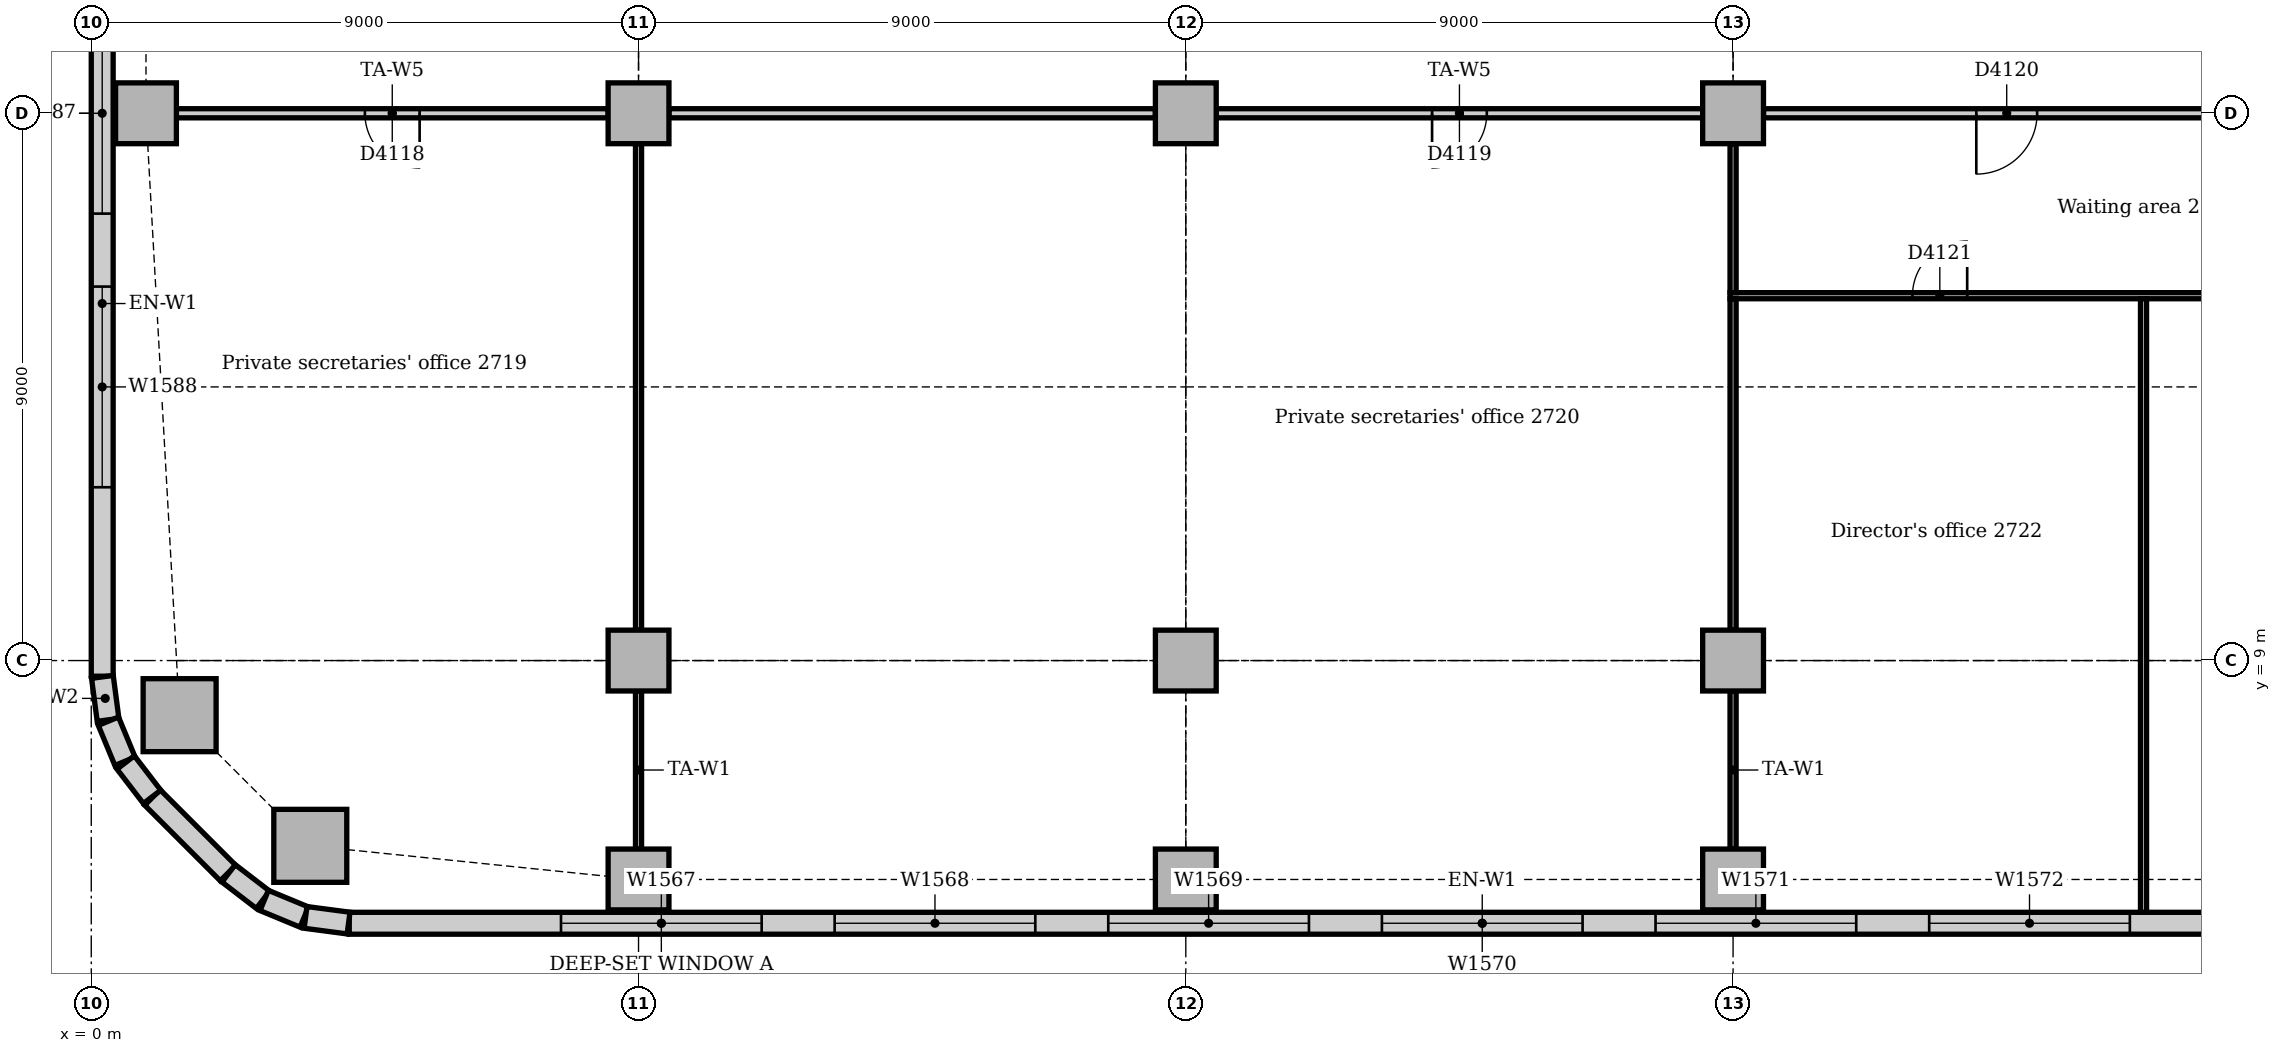
"""IFC4 building model, lengths in metres.
Left out: names, types, materials, properties, quantities, classifications, styles, units other than length and angle.
Written with IfcOpenShell. Run it as: python <this file> out.ifc"""

import sys

from ifc_helpers import new_model, si_unit, direction, frame, frame_2d, origin, origin_2d, place, context, subcontext, project, spatial, rectangle, extrude, element, fill, save


model = new_model("IFC4")
c1 = context("Model", 3, precision=1e-05, world=origin(), true_north=direction((0.0, 1.0)))
c2 = subcontext(c1, "Body", "Model", "MODEL_VIEW")
j1 = project(units=[si_unit("LENGTHUNIT", "METRE"), si_unit("PLANEANGLEUNIT", "RADIAN")], contexts=[c1])
p1 = place(None, origin())
s1 = spatial("IfcSite", under=j1, at=p1, CompositionType="ELEMENT")
p2 = place(p1, origin())
s2 = spatial("IfcBuilding", under=s1, at=p2, CompositionType="ELEMENT")
p3 = place(p2, frame((0.0, 0.0, 116.0)))
s3 = spatial("IfcBuildingStorey", under=s2, at=p3, CompositionType="ELEMENT", Elevation=116.0)
for number, where, z_axis, x_axis in (
    (1, (3.602, 5.953, 0.0), (0.0, 0.0, 1.0), (1.0, 0.0, 0.0)),
    (2, (1.453, 8.102, 0.0), (0.0, 0.0, 1.0), (1.0, 0.0, 0.0)),
):
    element("IfcColumn", number, at=place(p3, frame(where, z_axis=z_axis, x_axis=x_axis)), inside=s3, PredefinedType="COLUMN", context=c2, shape_type="SweptSolid", body=[
        extrude(rectangle(XDim=1.2, YDim=1.2, at=origin_2d()), origin(), (0.0, 0.0, 1.0), 3.85),
    ])
for number, where, z_axis, x_axis in (
    (3, (9.0, 5.4, 0.0), (0.0, 0.0, 1.0), (1.0, 0.0, 0.0)),
    (4, (18.0, 5.4, 0.0), (0.0, 0.0, 1.0), (1.0, 0.0, 0.0)),
    (5, (27.0, 5.4, 0.0), (0.0, 0.0, 1.0), (1.0, 0.0, 0.0)),
    (6, (0.9, 18.0, 0.0), (0.0, 0.0, 1.0), (1.0, 0.0, 0.0)),
    (7, (9.0, 9.0, 0.0), (0.0, 0.0, 1.0), (1.0, 0.0, 0.0)),
    (8, (9.0, 18.0, 0.0), (0.0, 0.0, 1.0), (1.0, 0.0, 0.0)),
    (9, (18.0, 9.0, 0.0), (0.0, 0.0, 1.0), (1.0, 0.0, 0.0)),
    (10, (18.0, 18.0, 0.0), (0.0, 0.0, 1.0), (1.0, 0.0, 0.0)),
    (11, (27.0, 9.0, 0.0), (0.0, 0.0, 1.0), (1.0, 0.0, 0.0)),
    (12, (27.0, 18.0, 0.0), (0.0, 0.0, 1.0), (1.0, 0.0, 0.0)),
):
    element("IfcColumn", number, at=place(p3, frame(where, z_axis=z_axis, x_axis=x_axis)), inside=s3, PredefinedType="COLUMN", context=c2, shape_type="SweptSolid", body=[
        extrude(rectangle(XDim=1.0, YDim=1.0, at=origin_2d()), origin(), (0.0, 0.0, 1.0), 3.85),
    ])
p4 = place(p3, frame((4.243, 4.68, 0.0), z_axis=(0.0, 0.0, 1.0), x_axis=(1.0, 0.0, 0.0)))
e13 = element("IfcWall", 13, at=p4, inside=s3, PredefinedType="STANDARD", context=c2, shape_type="SweptSolid", body=[
    extrude(rectangle(XDim=37.265, YDim=0.36, at=frame_2d((18.632, 0.0))), origin(), (0.0, 0.0, 1.0), 3.85),
])
p5 = place(p4, frame((3.482, 0.0, 0.9)))
e14 = element("IfcOpeningElement", 14, at=p5, cuts=e13, PredefinedType="OPENING", context=c2, shape_type="SweptSolid", body=[
    extrude(rectangle(XDim=3.3, YDim=1.6, at=frame_2d((1.65, 0.8))), frame((0.0, 0.19, 0.0), z_axis=(0.0, -1.0, 0.0), x_axis=(1.0, 0.0, 0.0)), (0.0, 0.0, 1.0), 0.38),
])
p6 = place(p4, frame((7.982, 0.0, 0.9)))
e15 = element("IfcOpeningElement", 15, at=p6, cuts=e13, PredefinedType="OPENING", context=c2, shape_type="SweptSolid", body=[
    extrude(rectangle(XDim=3.3, YDim=1.6, at=frame_2d((1.65, 0.8))), frame((0.0, 0.19, 0.0), z_axis=(0.0, -1.0, 0.0), x_axis=(1.0, 0.0, 0.0)), (0.0, 0.0, 1.0), 0.38),
])
p7 = place(p4, frame((12.482, 0.0, 0.9)))
e16 = element("IfcOpeningElement", 16, at=p7, cuts=e13, PredefinedType="OPENING", context=c2, shape_type="SweptSolid", body=[
    extrude(rectangle(XDim=3.3, YDim=1.6, at=frame_2d((1.65, 0.8))), frame((0.0, 0.19, 0.0), z_axis=(0.0, -1.0, 0.0), x_axis=(1.0, 0.0, 0.0)), (0.0, 0.0, 1.0), 0.38),
])
p8 = place(p4, frame((16.982, 0.0, 0.9)))
e17 = element("IfcOpeningElement", 17, at=p8, cuts=e13, PredefinedType="OPENING", context=c2, shape_type="SweptSolid", body=[
    extrude(rectangle(XDim=3.3, YDim=1.6, at=frame_2d((1.65, 0.8))), frame((0.0, 0.19, 0.0), z_axis=(0.0, -1.0, 0.0), x_axis=(1.0, 0.0, 0.0)), (0.0, 0.0, 1.0), 0.38),
])
p9 = place(p4, frame((21.482, 0.0, 0.9)))
e18 = element("IfcOpeningElement", 18, at=p9, cuts=e13, PredefinedType="OPENING", context=c2, shape_type="SweptSolid", body=[
    extrude(rectangle(XDim=3.3, YDim=1.6, at=frame_2d((1.65, 0.8))), frame((0.0, 0.19, 0.0), z_axis=(0.0, -1.0, 0.0), x_axis=(1.0, 0.0, 0.0)), (0.0, 0.0, 1.0), 0.38),
])
p10 = place(p4, frame((25.982, 0.0, 0.9)))
e19 = element("IfcOpeningElement", 19, at=p10, cuts=e13, PredefinedType="OPENING", context=c2, shape_type="SweptSolid", body=[
    extrude(rectangle(XDim=3.3, YDim=1.6, at=frame_2d((1.65, 0.8))), frame((0.0, 0.19, 0.0), z_axis=(0.0, -1.0, 0.0), x_axis=(1.0, 0.0, 0.0)), (0.0, 0.0, 1.0), 0.38),
])
p11 = place(p4, frame((30.482, 0.0, 0.9)))
e20 = element("IfcOpeningElement", 20, at=p11, cuts=e13, PredefinedType="OPENING", context=c2, shape_type="SweptSolid", body=[
    extrude(rectangle(XDim=3.3, YDim=1.6, at=frame_2d((1.65, 0.8))), frame((0.0, 0.19, 0.0), z_axis=(0.0, -1.0, 0.0), x_axis=(1.0, 0.0, 0.0)), (0.0, 0.0, 1.0), 0.38),
])
p12 = place(p3, frame((0.18, 21.0, 0.0), z_axis=(0.0, 0.0, 1.0), x_axis=(0.0, -1.0, 0.0)))
e21 = element("IfcWall", 21, at=p12, inside=s3, PredefinedType="STANDARD", context=c2, shape_type="SweptSolid", body=[
    extrude(rectangle(XDim=12.257, YDim=0.36, at=frame_2d((6.129, 0.0))), origin(), (0.0, 0.0, 1.0), 3.85),
])
p13 = place(p12, frame((1.35, 0.0, 0.9)))
e22 = element("IfcOpeningElement", 22, at=p13, cuts=e21, PredefinedType="OPENING", context=c2, shape_type="SweptSolid", body=[
    extrude(rectangle(XDim=3.3, YDim=1.6, at=frame_2d((1.65, 0.8))), frame((0.0, 0.19, 0.0), z_axis=(0.0, -1.0, 0.0), x_axis=(1.0, 0.0, 0.0)), (0.0, 0.0, 1.0), 0.38),
])
p14 = place(p12, frame((5.85, 0.0, 0.9)))
e23 = element("IfcOpeningElement", 23, at=p14, cuts=e21, PredefinedType="OPENING", context=c2, shape_type="SweptSolid", body=[
    extrude(rectangle(XDim=3.3, YDim=1.6, at=frame_2d((1.65, 0.8))), frame((0.0, 0.19, 0.0), z_axis=(0.0, -1.0, 0.0), x_axis=(1.0, 0.0, 0.0)), (0.0, 0.0, 1.0), 0.38),
])
p15 = place(p3, frame((1.006, 6.749, 0.0), z_axis=(0.0, 0.0, 1.0), x_axis=(0.707106781187, -0.707106781187, 0.0)))
e24 = element("IfcWall", 24, at=p15, inside=s3, PredefinedType="STANDARD", context=c2, shape_type="SweptSolid", body=[
    extrude(rectangle(XDim=1.757, YDim=0.36, at=frame_2d((0.879, 0.0))), origin(), (0.0, 0.0, 1.0), 3.85),
])
for number, where, z_axis, x_axis in (
    (25, (0.183, 8.731, 0.0), (0.0, 0.0, 1.0), (0.131, -0.991, 0.0)),
    (26, (0.282, 8.003, 0.0), (0.0, 0.0, 1.0), (0.383, -0.924, 0.0)),
):
    element("IfcWall", number, at=place(p3, frame(where, z_axis=z_axis, x_axis=x_axis)), inside=s3, PredefinedType="STANDARD", context=c2, shape_type="SweptSolid", body=[
        extrude(rectangle(XDim=0.713, YDim=0.36, at=frame_2d((0.356, 0.0))), origin(), (0.0, 0.0, 1.0), 3.85),
    ])
for number, where, z_axis, x_axis in (
    (27, (0.566, 7.324, 0.0), (0.0, 0.0, 1.0), (0.609, -0.793, 0.0)),
    (28, (2.259, 5.5, 0.0), (0.0, 0.0, 1.0), (0.793, -0.609, 0.0)),
):
    element("IfcWall", number, at=place(p3, frame(where, z_axis=z_axis, x_axis=x_axis)), inside=s3, PredefinedType="STANDARD", context=c2, shape_type="SweptSolid", body=[
        extrude(rectangle(XDim=0.713, YDim=0.36, at=frame_2d((0.357, 0.0))), origin(), (0.0, 0.0, 1.0), 3.85),
    ])
for number, where, z_axis, x_axis in (
    (29, (2.844, 5.055, 0.0), (0.0, 0.0, 1.0), (0.924, -0.383, 0.0)),
    (30, (3.524, 4.776, 0.0), (0.0, 0.0, 1.0), (0.991, -0.131, 0.0)),
):
    element("IfcWall", number, at=place(p3, frame(where, z_axis=z_axis, x_axis=x_axis)), inside=s3, PredefinedType="STANDARD", context=c2, shape_type="SweptSolid", body=[
        extrude(rectangle(XDim=0.713, YDim=0.36, at=frame_2d((0.356, 0.0))), origin(), (0.0, 0.0, 1.0), 3.85),
    ])
p16 = place(p3, frame((27.5, 18.0, 0.0), z_axis=(0.0, 0.0, 1.0), x_axis=(1.0, 0.0, 0.0)))
e31 = element("IfcWall", 31, at=p16, inside=s3, PredefinedType="PARTITIONING", context=c2, shape_type="SweptSolid", body=[
    extrude(rectangle(XDim=8.0, YDim=0.15, at=frame_2d((4.0, 0.0))), origin(), (0.0, 0.0, 1.0), 3.158),
])
p17 = place(p16, frame((3.5, 0.0, 0.0)))
e32 = element("IfcOpeningElement", 32, at=p17, cuts=e31, PredefinedType="OPENING", context=c2, shape_type="SweptSolid", body=[
    extrude(rectangle(XDim=1.0, YDim=2.1, at=frame_2d((0.5, 1.05))), frame((0.0, 0.085, 0.0), z_axis=(0.0, -1.0, 0.0), x_axis=(1.0, 0.0, 0.0)), (0.0, 0.0, 1.0), 0.17),
])
p18 = place(p3, frame((18.5, 18.0, 0.0), z_axis=(0.0, 0.0, 1.0), x_axis=(1.0, 0.0, 0.0)))
e33 = element("IfcWall", 33, at=p18, inside=s3, PredefinedType="PARTITIONING", context=c2, shape_type="SweptSolid", body=[
    extrude(rectangle(XDim=8.0, YDim=0.15, at=frame_2d((4.0, 0.0))), origin(), (0.0, 0.0, 1.0), 3.158),
])
p19 = place(p18, frame((3.55, 0.0, 0.0)))
e34 = element("IfcOpeningElement", 34, at=p19, cuts=e33, PredefinedType="OPENING", context=c2, shape_type="SweptSolid", body=[
    extrude(rectangle(XDim=0.9, YDim=2.1, at=frame_2d((0.45, 1.05))), frame((0.0, 0.085, 0.0), z_axis=(0.0, -1.0, 0.0), x_axis=(1.0, 0.0, 0.0)), (0.0, 0.0, 1.0), 0.17),
])
p20 = place(p3, frame((9.5, 18.0, 0.0), z_axis=(0.0, 0.0, 1.0), x_axis=(1.0, 0.0, 0.0)))
e35 = element("IfcWall", 35, at=p20, inside=s3, PredefinedType="PARTITIONING", context=c2, shape_type="SweptSolid", body=[
    extrude(rectangle(XDim=8.0, YDim=0.15, at=frame_2d((4.0, 0.0))), origin(), (0.0, 0.0, 1.0), 3.158),
])
p21 = place(p3, frame((1.4, 18.0, 0.0), z_axis=(0.0, 0.0, 1.0), x_axis=(1.0, 0.0, 0.0)))
e36 = element("IfcWall", 36, at=p21, inside=s3, PredefinedType="PARTITIONING", context=c2, shape_type="SweptSolid", body=[
    extrude(rectangle(XDim=7.1, YDim=0.15, at=frame_2d((3.55, 0.0))), origin(), (0.0, 0.0, 1.0), 3.158),
])
p22 = place(p21, frame((3.1, 0.0, 0.0)))
e37 = element("IfcOpeningElement", 37, at=p22, cuts=e36, PredefinedType="OPENING", context=c2, shape_type="SweptSolid", body=[
    extrude(rectangle(XDim=0.9, YDim=2.1, at=frame_2d((0.45, 1.05))), frame((0.0, 0.085, 0.0), z_axis=(0.0, -1.0, 0.0), x_axis=(1.0, 0.0, 0.0)), (0.0, 0.0, 1.0), 0.17),
])
p23 = place(p3, frame((26.95, 15.0, 0.0), z_axis=(0.0, 0.0, 1.0), x_axis=(1.0, 0.0, 0.0)))
e38 = element("IfcWall", 38, at=p23, inside=s3, PredefinedType="PARTITIONING", context=c2, shape_type="SweptSolid", body=[
    extrude(rectangle(XDim=13.6, YDim=0.1, at=frame_2d((6.8, 0.0))), origin(), (0.0, 0.0, 1.0), 3.85),
])
p24 = place(p23, frame((3.0, 0.0, 0.0)))
e39 = element("IfcOpeningElement", 39, at=p24, cuts=e38, PredefinedType="OPENING", context=c2, shape_type="SweptSolid", body=[
    extrude(rectangle(XDim=0.9, YDim=2.1, at=frame_2d((0.45, 1.05))), frame((0.0, 0.06, 0.0), z_axis=(0.0, -1.0, 0.0), x_axis=(1.0, 0.0, 0.0)), (0.0, 0.0, 1.0), 0.12),
])
p25 = place(p23, frame((9.65, 0.0, 0.0)))
e40 = element("IfcOpeningElement", 40, at=p25, cuts=e38, PredefinedType="OPENING", context=c2, shape_type="SweptSolid", body=[
    extrude(rectangle(XDim=0.9, YDim=2.1, at=frame_2d((0.45, 1.05))), frame((0.0, 0.06, 0.0), z_axis=(0.0, -1.0, 0.0), x_axis=(1.0, 0.0, 0.0)), (0.0, 0.0, 1.0), 0.12),
])
p26 = place(p3, frame((9.0, 5.9, 0.0), z_axis=(0.0, 0.0, 1.0), x_axis=(0.0, 1.0, 0.0)))
e41 = element("IfcWall", 41, at=p26, inside=s3, PredefinedType="PARTITIONING", context=c2, shape_type="SweptSolid", body=[
    extrude(rectangle(XDim=2.6, YDim=0.1, at=frame_2d((1.3, 0.0))), origin(), (0.0, 0.0, 1.0), 3.652),
])
p27 = place(p3, frame((9.0, 9.5, 0.0), z_axis=(0.0, 0.0, 1.0), x_axis=(0.0, 1.0, 0.0)))
e42 = element("IfcWall", 42, at=p27, inside=s3, PredefinedType="PARTITIONING", context=c2, shape_type="SweptSolid", body=[
    extrude(rectangle(XDim=8.0, YDim=0.1, at=frame_2d((4.0, 0.0))), origin(), (0.0, 0.0, 1.0), 3.256),
])
p28 = place(p3, frame((27.0, 5.9, 0.0), z_axis=(0.0, 0.0, 1.0), x_axis=(0.0, 1.0, 0.0)))
e43 = element("IfcWall", 43, at=p28, inside=s3, PredefinedType="PARTITIONING", context=c2, shape_type="SweptSolid", body=[
    extrude(rectangle(XDim=2.6, YDim=0.1, at=frame_2d((1.3, 0.0))), origin(), (0.0, 0.0, 1.0), 3.652),
])
p29 = place(p3, frame((27.0, 15.05, 0.0), z_axis=(0.0, 0.0, 1.0), x_axis=(0.0, 1.0, 0.0)))
e44 = element("IfcWall", 44, at=p29, inside=s3, PredefinedType="PARTITIONING", context=c2, shape_type="SweptSolid", body=[
    extrude(rectangle(XDim=2.45, YDim=0.1, at=frame_2d((1.225, 0.0))), origin(), (0.0, 0.0, 1.0), 3.256),
])
p30 = place(p3, frame((27.0, 9.5, 0.0), z_axis=(0.0, 0.0, 1.0), x_axis=(0.0, 1.0, 0.0)))
e45 = element("IfcWall", 45, at=p30, inside=s3, PredefinedType="PARTITIONING", context=c2, shape_type="SweptSolid", body=[
    extrude(rectangle(XDim=5.45, YDim=0.1, at=frame_2d((2.725, 0.0))), origin(), (0.0, 0.0, 1.0), 3.256),
])
p31 = place(p3, frame((33.75, 4.86, 0.0), z_axis=(0.0, 0.0, 1.0), x_axis=(0.0, 1.0, 0.0)))
e46 = element("IfcWall", 46, at=p31, inside=s3, PredefinedType="PARTITIONING", context=c2, shape_type="SweptSolid", body=[
    extrude(rectangle(XDim=10.09, YDim=0.1, at=frame_2d((5.045, 0.0))), origin(), (0.0, 0.0, 1.0), 3.85),
])
p32 = place(p5, origin())
e47 = element("IfcWindow", 47, at=p32, inside=s3, PartitioningType="SINGLE_PANEL", PredefinedType="WINDOW", context=c2, shape_type="SweptSolid", body=[
    extrude(rectangle(XDim=3.3, YDim=1.6, at=frame_2d((1.65, 0.8))), frame((0.0, 0.13, 0.0), z_axis=(0.0, -1.0, 0.0), x_axis=(1.0, 0.0, 0.0)), (0.0, 0.0, 1.0), 0.06),
])
fill(e14, e47)
p33 = place(p6, origin())
e48 = element("IfcWindow", 48, at=p33, inside=s3, PartitioningType="SINGLE_PANEL", PredefinedType="WINDOW", context=c2, shape_type="SweptSolid", body=[
    extrude(rectangle(XDim=3.3, YDim=1.6, at=frame_2d((1.65, 0.8))), frame((0.0, 0.13, 0.0), z_axis=(0.0, -1.0, 0.0), x_axis=(1.0, 0.0, 0.0)), (0.0, 0.0, 1.0), 0.06),
])
fill(e15, e48)
p34 = place(p7, origin())
e49 = element("IfcWindow", 49, at=p34, inside=s3, PartitioningType="SINGLE_PANEL", PredefinedType="WINDOW", context=c2, shape_type="SweptSolid", body=[
    extrude(rectangle(XDim=3.3, YDim=1.6, at=frame_2d((1.65, 0.8))), frame((0.0, 0.13, 0.0), z_axis=(0.0, -1.0, 0.0), x_axis=(1.0, 0.0, 0.0)), (0.0, 0.0, 1.0), 0.06),
])
fill(e16, e49)
p35 = place(p8, origin())
e50 = element("IfcWindow", 50, at=p35, inside=s3, PartitioningType="SINGLE_PANEL", PredefinedType="WINDOW", context=c2, shape_type="SweptSolid", body=[
    extrude(rectangle(XDim=3.3, YDim=1.6, at=frame_2d((1.65, 0.8))), frame((0.0, 0.13, 0.0), z_axis=(0.0, -1.0, 0.0), x_axis=(1.0, 0.0, 0.0)), (0.0, 0.0, 1.0), 0.06),
])
fill(e17, e50)
p36 = place(p9, origin())
e51 = element("IfcWindow", 51, at=p36, inside=s3, PartitioningType="SINGLE_PANEL", PredefinedType="WINDOW", context=c2, shape_type="SweptSolid", body=[
    extrude(rectangle(XDim=3.3, YDim=1.6, at=frame_2d((1.65, 0.8))), frame((0.0, 0.13, 0.0), z_axis=(0.0, -1.0, 0.0), x_axis=(1.0, 0.0, 0.0)), (0.0, 0.0, 1.0), 0.06),
])
fill(e18, e51)
p37 = place(p10, origin())
e52 = element("IfcWindow", 52, at=p37, inside=s3, PartitioningType="SINGLE_PANEL", PredefinedType="WINDOW", context=c2, shape_type="SweptSolid", body=[
    extrude(rectangle(XDim=3.3, YDim=1.6, at=frame_2d((1.65, 0.8))), frame((0.0, 0.13, 0.0), z_axis=(0.0, -1.0, 0.0), x_axis=(1.0, 0.0, 0.0)), (0.0, 0.0, 1.0), 0.06),
])
fill(e19, e52)
p38 = place(p13, origin())
e53 = element("IfcWindow", 53, at=p38, inside=s3, PartitioningType="SINGLE_PANEL", PredefinedType="WINDOW", context=c2, shape_type="SweptSolid", body=[
    extrude(rectangle(XDim=3.3, YDim=1.6, at=frame_2d((1.65, 0.8))), frame((0.0, 0.13, 0.0), z_axis=(0.0, -1.0, 0.0), x_axis=(1.0, 0.0, 0.0)), (0.0, 0.0, 1.0), 0.06),
])
fill(e22, e53)
p39 = place(p14, origin())
e54 = element("IfcWindow", 54, at=p39, inside=s3, PartitioningType="SINGLE_PANEL", PredefinedType="WINDOW", context=c2, shape_type="SweptSolid", body=[
    extrude(rectangle(XDim=3.3, YDim=1.6, at=frame_2d((1.65, 0.8))), frame((0.0, 0.13, 0.0), z_axis=(0.0, -1.0, 0.0), x_axis=(1.0, 0.0, 0.0)), (0.0, 0.0, 1.0), 0.06),
])
fill(e23, e54)
p40 = place(p22, frame((0.9, 0.0, 0.0), z_axis=(0.0, 0.0, 1.0), x_axis=(-1.0, 0.0, 0.0)))
e55 = element("IfcDoor", 55, at=p40, inside=s3, OperationType="SINGLE_SWING_LEFT", PredefinedType="DOOR", context=c2, shape_type="SweptSolid", body=[
    extrude(rectangle(XDim=0.9, YDim=2.1, at=frame_2d((0.45, 1.05))), frame((0.0, 0.025, 0.0), z_axis=(0.0, -1.0, 0.0), x_axis=(1.0, 0.0, 0.0)), (0.0, 0.0, 1.0), 0.05),
])
fill(e37, e55)
p41 = place(p19, frame((0.9, 0.0, 0.0), z_axis=(0.0, 0.0, 1.0), x_axis=(-1.0, 0.0, 0.0)))
e56 = element("IfcDoor", 56, at=p41, inside=s3, OperationType="SINGLE_SWING_RIGHT", PredefinedType="DOOR", context=c2, shape_type="SweptSolid", body=[
    extrude(rectangle(XDim=0.9, YDim=2.1, at=frame_2d((0.45, 1.05))), frame((0.0, 0.025, 0.0), z_axis=(0.0, -1.0, 0.0), x_axis=(1.0, 0.0, 0.0)), (0.0, 0.0, 1.0), 0.05),
])
fill(e34, e56)
p42 = place(p17, frame((1.0, 0.0, 0.0), z_axis=(0.0, 0.0, 1.0), x_axis=(-1.0, 0.0, 0.0)))
e57 = element("IfcDoor", 57, at=p42, inside=s3, OperationType="SINGLE_SWING_RIGHT", PredefinedType="DOOR", context=c2, shape_type="SweptSolid", body=[
    extrude(rectangle(XDim=1.0, YDim=2.1, at=frame_2d((0.5, 1.05))), frame((0.0, 0.025, 0.0), z_axis=(0.0, -1.0, 0.0), x_axis=(1.0, 0.0, 0.0)), (0.0, 0.0, 1.0), 0.05),
])
fill(e32, e57)
p43 = place(p24, origin())
e58 = element("IfcDoor", 58, at=p43, inside=s3, OperationType="SINGLE_SWING_RIGHT", PredefinedType="DOOR", context=c2, shape_type="SweptSolid", body=[
    extrude(rectangle(XDim=0.9, YDim=2.1, at=frame_2d((0.45, 1.05))), frame((0.0, 0.025, 0.0), z_axis=(0.0, -1.0, 0.0), x_axis=(1.0, 0.0, 0.0)), (0.0, 0.0, 1.0), 0.05),
])
fill(e39, e58)
save(model, sys.argv[1])
